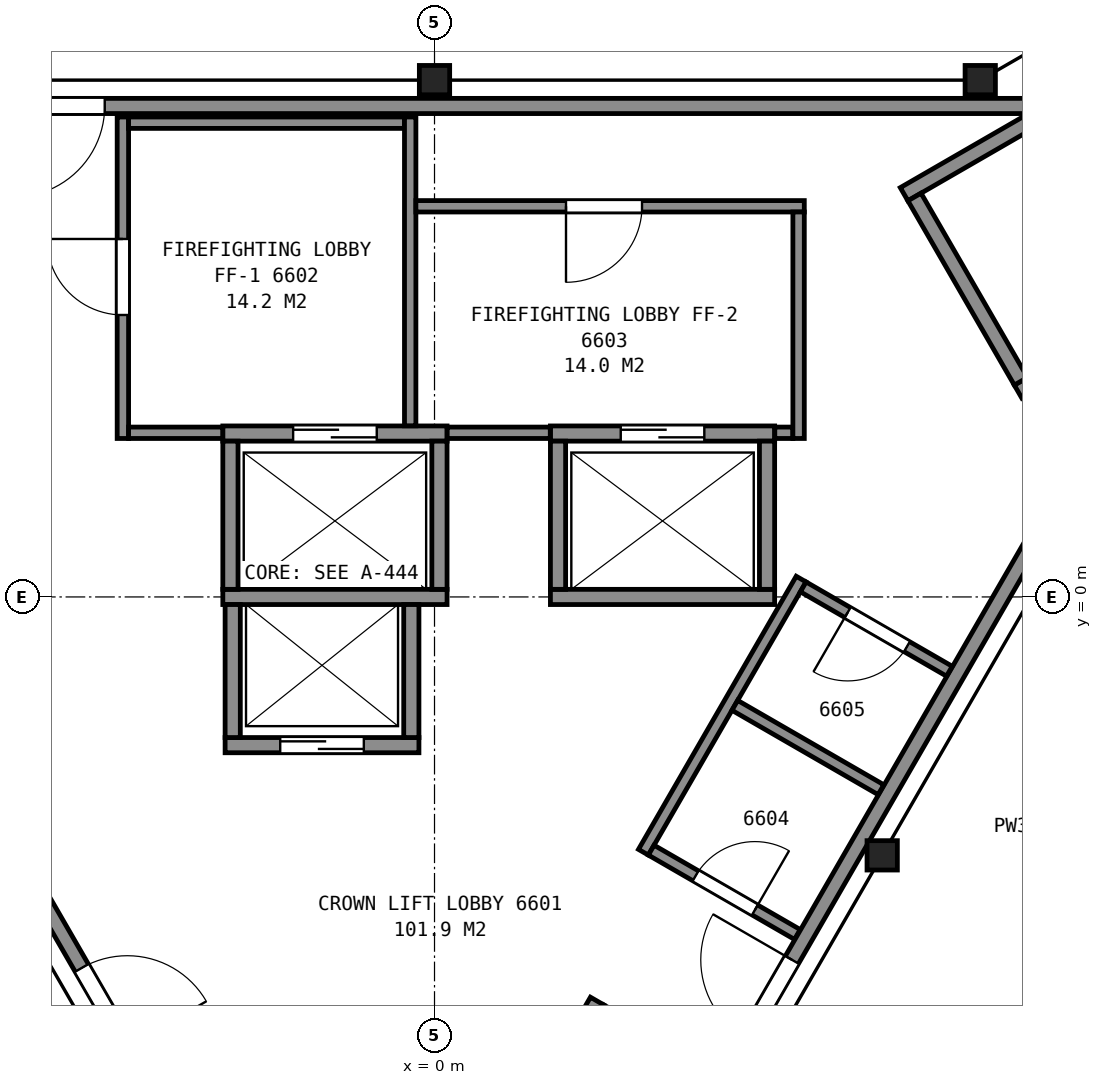
"""IFC4 building model, lengths in metres.
Left out: names, types, materials, properties, quantities, classifications, styles, units other than length and angle.
Written with IfcOpenShell. Run it as: python <this file> out.ifc"""

import sys

from ifc_helpers import new_model, si_unit, direction, frame, frame_2d, origin, origin_2d, place, context, subcontext, project, spatial, rectangle, i_section, extrude, element, fill, save


model = new_model("IFC4")
c1 = context("Model", 3, precision=1e-05, world=origin(), true_north=direction((0.0, 1.0)))
c2 = subcontext(c1, "Body", "Model", "MODEL_VIEW")
j1 = project(units=[si_unit("LENGTHUNIT", "METRE"), si_unit("PLANEANGLEUNIT", "RADIAN")], contexts=[c1])
p1 = place(None, origin())
s1 = spatial("IfcSite", under=j1, at=p1, CompositionType="ELEMENT")
p2 = place(p1, origin())
s2 = spatial("IfcBuilding", under=s1, at=p2, CompositionType="ELEMENT")
p3 = place(p2, frame((0.0, 0.0, 264.0)))
s3 = spatial("IfcBuildingStorey", under=s2, at=p3, CompositionType="ELEMENT", Elevation=264.0)
p4 = place(p3, frame((7.18, 6.8, 0.065), z_axis=(0.0, 0.0, 1.0), x_axis=(1.0, 0.0, 0.0)))
e1 = element("IfcColumn", 1, at=p4, inside=s3, PredefinedType="COLUMN", context=c2, shape_type="SweptSolid", body=[
    extrude(i_section(OverallWidth=0.399, OverallDepth=0.386, WebThickness=0.021, FlangeThickness=0.033, FilletRadius=0.015, at=origin_2d()), origin(), (0.0, 0.0, 1.0), 3.635),
])
p5 = place(p3, frame((0.0, 6.8, 0.03), z_axis=(0.0, 0.0, 1.0), x_axis=(1.0, 0.0, 0.0)))
e2 = element("IfcColumn", 2, at=p5, inside=s3, PredefinedType="COLUMN", context=c2, shape_type="SweptSolid", body=[
    extrude(i_section(OverallWidth=0.399, OverallDepth=0.386, WebThickness=0.021, FlangeThickness=0.033, FilletRadius=0.015, at=origin_2d()), origin(), (0.0, 0.0, 1.0), 3.67),
])
p6 = place(p3, frame((5.89, -3.4, 0.04), z_axis=(0.0, 0.0, 1.0), x_axis=(1.0, 0.0, 0.0)))
e3 = element("IfcColumn", 3, at=p6, inside=s3, PredefinedType="COLUMN", context=c2, shape_type="SweptSolid", body=[
    extrude(i_section(OverallWidth=0.399, OverallDepth=0.386, WebThickness=0.021, FlangeThickness=0.033, FilletRadius=0.015, at=origin_2d()), origin(), (0.0, 0.0, 1.0), 3.66),
])
for number, where, z_axis, x_axis in (
    (4, (6.178, 5.299, 0.0), (0.0, 0.0, 1.0), (0.866, 0.5, 0.0)),
    (5, (7.678, 2.701, 0.0), (0.0, 0.0, 1.0), (0.866, 0.5, 0.0)),
):
    element("IfcWall", number, at=place(p3, frame(where, z_axis=z_axis, x_axis=x_axis)), inside=s3, PredefinedType="PARTITIONING", context=c2, shape_type="SweptSolid", body=[
        extrude(rectangle(XDim=7.2, YDim=0.2, at=frame_2d((3.6, 0.0))), origin(), (0.0, 0.0, 1.0), 3.45),
    ])
p7 = place(p3, frame((7.715, 2.838, 0.0), z_axis=(0.0, 0.0, 1.0), x_axis=(-0.500049511043, 0.865996816683, 0.0)))
e6 = element("IfcWall", 6, at=p7, inside=s3, PredefinedType="PARTITIONING", context=c2, shape_type="SweptSolid", body=[
    extrude(rectangle(XDim=2.8, YDim=0.2, at=frame_2d((1.4, 0.0))), origin(), (0.0, 0.0, 1.0), 3.45),
])
p8 = place(p3, frame((-2.755, -1.95, 0.0), z_axis=(0.0, 0.0, 1.0), x_axis=(1.0, 0.0, 0.0)))
e7 = element("IfcWall", 7, at=p8, inside=s3, PredefinedType="PARTITIONING", context=c2, shape_type="SweptSolid", body=[
    extrude(rectangle(XDim=2.55, YDim=0.2, at=frame_2d((1.275, 0.0))), origin(), (0.0, 0.0, 1.0), 3.7),
])
p9 = place(p8, frame((0.725, 0.0, 0.0)))
e8 = element("IfcOpeningElement", 8, at=p9, cuts=e7, PredefinedType="OPENING", context=c2, shape_type="SweptSolid", body=[
    extrude(rectangle(XDim=1.1, YDim=2.1, at=frame_2d((0.55, 1.05))), frame((0.0, 0.11, 0.0), z_axis=(0.0, -1.0, 0.0), x_axis=(1.0, 0.0, 0.0)), (0.0, 0.0, 1.0), 0.22),
])
p10 = place(p3, frame((-2.785, 0.0, 0.0), z_axis=(0.0, 0.0, 1.0), x_axis=(1.0, 0.0, 0.0)))
e9 = element("IfcWall", 9, at=p10, inside=s3, PredefinedType="PARTITIONING", context=c2, shape_type="SweptSolid", body=[
    extrude(rectangle(XDim=2.95, YDim=0.2, at=frame_2d((1.475, 0.0))), origin(), (0.0, 0.0, 1.0), 3.7),
])
p11 = place(p3, frame((1.525, 0.0, 0.0), z_axis=(0.0, 0.0, 1.0), x_axis=(1.0, 0.0, 0.0)))
e10 = element("IfcWall", 10, at=p11, inside=s3, PredefinedType="PARTITIONING", context=c2, shape_type="SweptSolid", body=[
    extrude(rectangle(XDim=2.95, YDim=0.2, at=frame_2d((1.475, 0.0))), origin(), (0.0, 0.0, 1.0), 3.7),
])
p12 = place(p3, frame((-2.785, 2.15, 0.0), z_axis=(0.0, 0.0, 1.0), x_axis=(1.0, 0.0, 0.0)))
e11 = element("IfcWall", 11, at=p12, inside=s3, PredefinedType="PARTITIONING", context=c2, shape_type="SweptSolid", body=[
    extrude(rectangle(XDim=2.95, YDim=0.2, at=frame_2d((1.475, 0.0))), origin(), (0.0, 0.0, 1.0), 3.7),
])
p13 = place(p12, frame((0.925, 0.0, 0.0)))
e12 = element("IfcOpeningElement", 12, at=p13, cuts=e11, PredefinedType="OPENING", context=c2, shape_type="SweptSolid", body=[
    extrude(rectangle(XDim=1.1, YDim=2.1, at=frame_2d((0.55, 1.05))), frame((0.0, 0.11, 0.0), z_axis=(0.0, -1.0, 0.0), x_axis=(1.0, 0.0, 0.0)), (0.0, 0.0, 1.0), 0.22),
])
p14 = place(p3, frame((1.525, 2.15, 0.0), z_axis=(0.0, 0.0, 1.0), x_axis=(1.0, 0.0, 0.0)))
e13 = element("IfcWall", 13, at=p14, inside=s3, PredefinedType="PARTITIONING", context=c2, shape_type="SweptSolid", body=[
    extrude(rectangle(XDim=2.95, YDim=0.2, at=frame_2d((1.475, 0.0))), origin(), (0.0, 0.0, 1.0), 3.7),
])
p15 = place(p14, frame((0.925, 0.0, 0.0)))
e14 = element("IfcOpeningElement", 14, at=p15, cuts=e13, PredefinedType="OPENING", context=c2, shape_type="SweptSolid", body=[
    extrude(rectangle(XDim=1.1, YDim=2.1, at=frame_2d((0.55, 1.05))), frame((0.0, 0.11, 0.0), z_axis=(0.0, -1.0, 0.0), x_axis=(1.0, 0.0, 0.0)), (0.0, 0.0, 1.0), 0.22),
])
p16 = place(p3, frame((0.863, -7.525, 0.0), z_axis=(0.0, 0.0, 1.0), x_axis=(0.499990435942, 0.866030925526, 0.0)))
e15 = element("IfcWall", 15, at=p16, inside=s3, PredefinedType="PARTITIONING", context=c2, shape_type="SweptSolid", body=[
    extrude(rectangle(XDim=2.55, YDim=0.2, at=frame_2d((1.275, 0.0))), origin(), (0.0, 0.0, 1.0), 3.7),
])
p17 = place(p16, frame((0.725, 0.0, 0.0)))
e16 = element("IfcOpeningElement", 16, at=p17, cuts=e15, PredefinedType="OPENING", context=c2, shape_type="SweptSolid", body=[
    extrude(rectangle(XDim=1.1, YDim=2.1, at=frame_2d((0.55, 1.05))), frame((0.0, 0.11, 0.0), z_axis=(0.0, -1.0, 0.0), x_axis=(1.0, 0.0, 0.0)), (0.0, 0.0, 1.0), 0.22),
])
for number, where, z_axis, x_axis in (
    (17, (4.375, 0.1, 0.0), (0.0, 0.0, 1.0), (0.0, 1.0, 0.0)),
    (18, (1.625, 0.1, 0.0), (0.0, 0.0, 1.0), (0.0, 1.0, 0.0)),
    (19, (0.065, 0.1, 0.0), (0.0, 0.0, 1.0), (0.0, 1.0, 0.0)),
):
    element("IfcWall", number, at=place(p3, frame(where, z_axis=z_axis, x_axis=x_axis)), inside=s3, PredefinedType="PARTITIONING", context=c2, shape_type="SweptSolid", body=[
        extrude(rectangle(XDim=1.95, YDim=0.2, at=frame_2d((0.975, 0.0))), origin(), (0.0, 0.0, 1.0), 3.7),
    ])
for number, where, z_axis, x_axis in (
    (20, (-0.305, -1.85, 0.0), (0.0, 0.0, 1.0), (0.0, 1.0, 0.0)),
    (21, (-2.655, -1.85, 0.0), (0.0, 0.0, 1.0), (0.0, 1.0, 0.0)),
):
    element("IfcWall", number, at=place(p3, frame(where, z_axis=z_axis, x_axis=x_axis)), inside=s3, PredefinedType="PARTITIONING", context=c2, shape_type="SweptSolid", body=[
        extrude(rectangle(XDim=1.75, YDim=0.2, at=frame_2d((0.875, 0.0))), origin(), (0.0, 0.0, 1.0), 3.7),
    ])
p18 = place(p3, frame((-2.685, 0.1, 0.0), z_axis=(0.0, 0.0, 1.0), x_axis=(0.0, 1.0, 0.0)))
e22 = element("IfcWall", 22, at=p18, inside=s3, PredefinedType="PARTITIONING", context=c2, shape_type="SweptSolid", body=[
    extrude(rectangle(XDim=1.95, YDim=0.2, at=frame_2d((0.975, 0.0))), origin(), (0.0, 0.0, 1.0), 3.7),
])
p19 = place(p3, frame((3.69, -6.328, 0.0), z_axis=(0.0, 0.0, 1.0), x_axis=(-0.866036909293, 0.499980071345, 0.0)))
e23 = element("IfcWall", 23, at=p19, inside=s3, PredefinedType="PARTITIONING", context=c2, shape_type="SweptSolid", body=[
    extrude(rectangle(XDim=1.75, YDim=0.2, at=frame_2d((0.875, 0.0))), origin(), (0.0, 0.0, 1.0), 3.7),
])
p20 = place(p3, frame((7.829, 6.46, 0.0), z_axis=(0.0, 0.0, 1.0), x_axis=(-1.0, 0.0, 0.0)))
e24 = element("IfcWall", 24, at=p20, inside=s3, PredefinedType="PARTITIONING", context=c2, shape_type="SweptSolid", body=[
    extrude(rectangle(XDim=15.658, YDim=0.2, at=frame_2d((7.829, 0.0))), origin(), (0.0, 0.0, 1.0), 3.45),
])
p21 = place(p20, frame((12.168, 0.0, 0.0)))
e25 = element("IfcOpeningElement", 25, at=p21, cuts=e24, PredefinedType="OPENING", context=c2, shape_type="SweptSolid", body=[
    extrude(rectangle(XDim=1.2, YDim=2.1, at=frame_2d((0.6, 1.05))), frame((0.0, 0.11, 0.0), z_axis=(0.0, -1.0, 0.0), x_axis=(1.0, 0.0, 0.0)), (0.0, 0.0, 1.0), 0.22),
])
p22 = place(p3, frame((-7.141, -0.551, 0.0), z_axis=(0.0, 0.0, 1.0), x_axis=(0.500001302854, -0.86602465158, 0.0)))
e26 = element("IfcWall", 26, at=p22, inside=s3, PredefinedType="PARTITIONING", context=c2, shape_type="SweptSolid", body=[
    extrude(rectangle(XDim=6.846, YDim=0.2, at=frame_2d((3.423, 0.0))), origin(), (0.0, 0.0, 1.0), 3.45),
])
p23 = place(p22, frame((5.0, 0.0, 0.0)))
e27 = element("IfcOpeningElement", 27, at=p23, cuts=e26, PredefinedType="OPENING", context=c2, shape_type="SweptSolid", body=[
    extrude(rectangle(XDim=1.2, YDim=2.1, at=frame_2d((0.6, 1.05))), frame((0.0, 0.11, 0.0), z_axis=(0.0, -1.0, 0.0), x_axis=(1.0, 0.0, 0.0)), (0.0, 0.0, 1.0), 0.22),
])
p24 = place(p3, frame((-4.1, 2.085, 0.0), z_axis=(0.0, 0.0, 1.0), x_axis=(0.0, 1.0, 0.0)))
e28 = element("IfcWall", 28, at=p24, inside=s3, PredefinedType="PARTITIONING", context=c2, shape_type="SweptSolid", body=[
    extrude(rectangle(XDim=4.23, YDim=0.15, at=frame_2d((2.115, 0.0))), origin(), (0.0, 0.0, 1.0), 3.45),
])
p25 = place(p24, frame((1.625, 0.0, 0.0)))
e29 = element("IfcOpeningElement", 29, at=p25, cuts=e28, PredefinedType="OPENING", context=c2, shape_type="SweptSolid", body=[
    extrude(rectangle(XDim=1.0, YDim=2.1, at=frame_2d((0.5, 1.05))), frame((0.0, 0.085, 0.0), z_axis=(0.0, -1.0, 0.0), x_axis=(1.0, 0.0, 0.0)), (0.0, 0.0, 1.0), 0.17),
])
p26 = place(p3, frame((-4.025, 2.16, 0.0), z_axis=(0.0, 0.0, 1.0), x_axis=(1.0, 0.0, 0.0)))
e30 = element("IfcWall", 30, at=p26, inside=s3, PredefinedType="PARTITIONING", context=c2, shape_type="SweptSolid", body=[
    extrude(rectangle(XDim=1.238, YDim=0.15, at=frame_2d((0.619, 0.0))), origin(), (0.0, 0.0, 1.0), 3.45),
])
p27 = place(p3, frame((-4.025, 6.24, 0.0), z_axis=(0.0, 0.0, 1.0), x_axis=(1.0, 0.0, 0.0)))
e31 = element("IfcWall", 31, at=p27, inside=s3, PredefinedType="PARTITIONING", context=c2, shape_type="SweptSolid", body=[
    extrude(rectangle(XDim=3.63, YDim=0.15, at=frame_2d((1.815, 0.0))), origin(), (0.0, 0.0, 1.0), 3.45),
])
p28 = place(p3, frame((-0.32, 2.252, 0.0), z_axis=(0.0, 0.0, 1.0), x_axis=(0.0, 1.0, 0.0)))
e32 = element("IfcWall", 32, at=p28, inside=s3, PredefinedType="PARTITIONING", context=c2, shape_type="SweptSolid", body=[
    extrude(rectangle(XDim=4.063, YDim=0.15, at=frame_2d((2.031, 0.0))), origin(), (0.0, 0.0, 1.0), 3.45),
])
p29 = place(p3, frame((-0.245, 5.14, 0.0), z_axis=(0.0, 0.0, 1.0), x_axis=(1.0, 0.0, 0.0)))
e33 = element("IfcWall", 33, at=p29, inside=s3, PredefinedType="PARTITIONING", context=c2, shape_type="SweptSolid", body=[
    extrude(rectangle(XDim=5.11, YDim=0.15, at=frame_2d((2.555, 0.0))), origin(), (0.0, 0.0, 1.0), 3.45),
])
p30 = place(p29, frame((1.975, 0.0, 0.0)))
e34 = element("IfcOpeningElement", 34, at=p30, cuts=e33, PredefinedType="OPENING", context=c2, shape_type="SweptSolid", body=[
    extrude(rectangle(XDim=1.0, YDim=2.1, at=frame_2d((0.5, 1.05))), frame((0.0, 0.085, 0.0), z_axis=(0.0, -1.0, 0.0), x_axis=(1.0, 0.0, 0.0)), (0.0, 0.0, 1.0), 0.17),
])
p31 = place(p3, frame((0.167, 2.16, 0.0), z_axis=(0.0, 0.0, 1.0), x_axis=(1.0, 0.0, 0.0)))
e35 = element("IfcWall", 35, at=p31, inside=s3, PredefinedType="PARTITIONING", context=c2, shape_type="SweptSolid", body=[
    extrude(rectangle(XDim=1.356, YDim=0.15, at=frame_2d((0.678, 0.0))), origin(), (0.0, 0.0, 1.0), 3.45),
])
p32 = place(p3, frame((2.749, -3.359, 0.0), z_axis=(0.0, 0.0, 1.0), x_axis=(0.500017827812, 0.866015110648, 0.0)))
e36 = element("IfcWall", 36, at=p32, inside=s3, PredefinedType="PARTITIONING", context=c2, shape_type="SweptSolid", body=[
    extrude(rectangle(XDim=4.15, YDim=0.15, at=frame_2d((2.075, 0.0))), origin(), (0.0, 0.0, 1.0), 3.45),
])
p33 = place(p3, frame((2.851, -3.332, 0.0), z_axis=(0.0, 0.0, 1.0), x_axis=(0.866110524189, -0.499852538144, 0.0)))
e37 = element("IfcWall", 37, at=p33, inside=s3, PredefinedType="PARTITIONING", context=c2, shape_type="SweptSolid", body=[
    extrude(rectangle(XDim=2.22, YDim=0.15, at=frame_2d((1.11, 0.0))), origin(), (0.0, 0.0, 1.0), 3.45),
])
p34 = place(p33, frame((0.675, 0.0, 0.0)))
e38 = element("IfcOpeningElement", 38, at=p34, cuts=e37, PredefinedType="OPENING", context=c2, shape_type="SweptSolid", body=[
    extrude(rectangle(XDim=0.9, YDim=2.1, at=frame_2d((0.45, 1.05))), frame((0.0, 0.085, 0.0), z_axis=(0.0, -1.0, 0.0), x_axis=(1.0, 0.0, 0.0)), (0.0, 0.0, 1.0), 0.17),
])
p35 = place(p3, frame((3.828, -6.29, 0.0), z_axis=(0.0, 0.0, 1.0), x_axis=(0.499979739078, 0.866037101117, 0.0)))
e39 = element("IfcWall", 39, at=p35, inside=s3, PredefinedType="PARTITIONING", context=c2, shape_type="SweptSolid", body=[
    extrude(rectangle(XDim=11.363, YDim=0.2, at=frame_2d((5.681, 0.0))), origin(), (0.0, 0.0, 1.0), 3.45),
])
p36 = place(p35, frame((0.55, 0.0, 0.0)))
e40 = element("IfcOpeningElement", 40, at=p36, cuts=e39, PredefinedType="OPENING", context=c2, shape_type="SweptSolid", body=[
    extrude(rectangle(XDim=1.2, YDim=2.1, at=frame_2d((0.6, 1.05))), frame((0.0, 0.11, 0.0), z_axis=(0.0, -1.0, 0.0), x_axis=(1.0, 0.0, 0.0)), (0.0, 0.0, 1.0), 0.22),
])
p37 = place(p3, frame((3.951, -1.427, 0.0), z_axis=(0.0, 0.0, 1.0), x_axis=(0.866062920605, -0.499935013329, 0.0)))
e41 = element("IfcWall", 41, at=p37, inside=s3, PredefinedType="PARTITIONING", context=c2, shape_type="SweptSolid", body=[
    extrude(rectangle(XDim=2.22, YDim=0.15, at=frame_2d((1.11, 0.0))), origin(), (0.0, 0.0, 1.0), 3.45),
])
p38 = place(p3, frame((4.477, 2.16, 0.0), z_axis=(0.0, 0.0, 1.0), x_axis=(1.0, 0.0, 0.0)))
e42 = element("IfcWall", 42, at=p38, inside=s3, PredefinedType="PARTITIONING", context=c2, shape_type="SweptSolid", body=[
    extrude(rectangle(XDim=0.238, YDim=0.15, at=frame_2d((0.119, 0.0))), origin(), (0.0, 0.0, 1.0), 3.45),
])
p39 = place(p3, frame((6.774, -0.978, 0.0), z_axis=(0.0, 0.0, 1.0), x_axis=(-0.866062920605, 0.499935013329, 0.0)))
e43 = element("IfcWall", 43, at=p39, inside=s3, PredefinedType="PARTITIONING", context=c2, shape_type="SweptSolid", body=[
    extrude(rectangle(XDim=2.22, YDim=0.15, at=frame_2d((1.11, 0.0))), origin(), (0.0, 0.0, 1.0), 3.45),
])
p40 = place(p39, frame((0.646, 0.0, 0.0)))
e44 = element("IfcOpeningElement", 44, at=p40, cuts=e43, PredefinedType="OPENING", context=c2, shape_type="SweptSolid", body=[
    extrude(rectangle(XDim=0.9, YDim=2.1, at=frame_2d((0.45, 1.05))), frame((0.0, 0.085, 0.0), z_axis=(0.0, -1.0, 0.0), x_axis=(1.0, 0.0, 0.0)), (0.0, 0.0, 1.0), 0.17),
])
p41 = place(p3, frame((4.79, 2.085, 0.0), z_axis=(0.0, 0.0, 1.0), x_axis=(0.0, 1.0, 0.0)))
e45 = element("IfcWall", 45, at=p41, inside=s3, PredefinedType="PARTITIONING", context=c2, shape_type="SweptSolid", body=[
    extrude(rectangle(XDim=2.98, YDim=0.15, at=frame_2d((1.49, 0.0))), origin(), (0.0, 0.0, 1.0), 3.45),
])
p42 = place(p9, origin())
e46 = element("IfcDoor", 46, at=p42, inside=s3, OperationType="SLIDING_TO_RIGHT", PredefinedType="DOOR", context=c2, shape_type="SweptSolid", body=[
    extrude(rectangle(XDim=1.1, YDim=2.1, at=frame_2d((0.55, 1.05))), frame((0.0, 0.025, 0.0), z_axis=(0.0, -1.0, 0.0), x_axis=(1.0, 0.0, 0.0)), (0.0, 0.0, 1.0), 0.05),
])
fill(e8, e46)
p43 = place(p13, origin())
e47 = element("IfcDoor", 47, at=p43, inside=s3, OperationType="SLIDING_TO_LEFT", PredefinedType="DOOR", context=c2, shape_type="SweptSolid", body=[
    extrude(rectangle(XDim=1.1, YDim=2.1, at=frame_2d((0.55, 1.05))), frame((0.0, 0.025, 0.0), z_axis=(0.0, -1.0, 0.0), x_axis=(1.0, 0.0, 0.0)), (0.0, 0.0, 1.0), 0.05),
])
fill(e12, e47)
p44 = place(p15, origin())
e48 = element("IfcDoor", 48, at=p44, inside=s3, OperationType="SLIDING_TO_RIGHT", PredefinedType="DOOR", context=c2, shape_type="SweptSolid", body=[
    extrude(rectangle(XDim=1.1, YDim=2.1, at=frame_2d((0.55, 1.05))), frame((0.0, 0.025, 0.0), z_axis=(0.0, -1.0, 0.0), x_axis=(1.0, 0.0, 0.0)), (0.0, 0.0, 1.0), 0.05),
])
fill(e14, e48)
p45 = place(p21, origin())
e49 = element("IfcDoor", 49, at=p45, inside=s3, OperationType="SINGLE_SWING_RIGHT", PredefinedType="DOOR", context=c2, shape_type="SweptSolid", body=[
    extrude(rectangle(XDim=1.2, YDim=2.1, at=frame_2d((0.6, 1.05))), frame((0.0, 0.025, 0.0), z_axis=(0.0, -1.0, 0.0), x_axis=(1.0, 0.0, 0.0)), (0.0, 0.0, 1.0), 0.05),
])
fill(e25, e49)
p46 = place(p23, origin())
e50 = element("IfcDoor", 50, at=p46, inside=s3, OperationType="SINGLE_SWING_RIGHT", PredefinedType="DOOR", context=c2, shape_type="SweptSolid", body=[
    extrude(rectangle(XDim=1.2, YDim=2.1, at=frame_2d((0.6, 1.05))), frame((0.0, 0.025, 0.0), z_axis=(0.0, -1.0, 0.0), x_axis=(1.0, 0.0, 0.0)), (0.0, 0.0, 1.0), 0.05),
])
fill(e27, e50)
p47 = place(p25, origin())
e51 = element("IfcDoor", 51, at=p47, inside=s3, OperationType="SINGLE_SWING_RIGHT", PredefinedType="DOOR", context=c2, shape_type="SweptSolid", body=[
    extrude(rectangle(XDim=1.0, YDim=2.1, at=frame_2d((0.5, 1.05))), frame((0.0, 0.025, 0.0), z_axis=(0.0, -1.0, 0.0), x_axis=(1.0, 0.0, 0.0)), (0.0, 0.0, 1.0), 0.05),
])
fill(e29, e51)
p48 = place(p30, origin())
e52 = element("IfcDoor", 52, at=p48, inside=s3, OperationType="SINGLE_SWING_LEFT", PredefinedType="DOOR", context=c2, shape_type="SweptSolid", body=[
    extrude(rectangle(XDim=1.0, YDim=2.1, at=frame_2d((0.5, 1.05))), frame((0.0, 0.025, 0.0), z_axis=(0.0, -1.0, 0.0), x_axis=(1.0, 0.0, 0.0)), (0.0, 0.0, 1.0), 0.05),
])
fill(e34, e52)
p49 = place(p34, origin())
e53 = element("IfcDoor", 53, at=p49, inside=s3, OperationType="SINGLE_SWING_RIGHT", PredefinedType="DOOR", context=c2, shape_type="SweptSolid", body=[
    extrude(rectangle(XDim=0.9, YDim=2.1, at=frame_2d((0.45, 1.05))), frame((0.0, 0.025, 0.0), z_axis=(0.0, -1.0, 0.0), x_axis=(1.0, 0.0, 0.0)), (0.0, 0.0, 1.0), 0.05),
])
fill(e38, e53)
p50 = place(p36, origin())
e54 = element("IfcDoor", 54, at=p50, inside=s3, OperationType="SINGLE_SWING_RIGHT", PredefinedType="DOOR", context=c2, shape_type="SweptSolid", body=[
    extrude(rectangle(XDim=1.2, YDim=2.1, at=frame_2d((0.6, 1.05))), frame((0.0, 0.025, 0.0), z_axis=(0.0, -1.0, 0.0), x_axis=(1.0, 0.0, 0.0)), (0.0, 0.0, 1.0), 0.05),
])
fill(e40, e54)
p51 = place(p40, origin())
e55 = element("IfcDoor", 55, at=p51, inside=s3, OperationType="SINGLE_SWING_RIGHT", PredefinedType="DOOR", context=c2, shape_type="SweptSolid", body=[
    extrude(rectangle(XDim=0.9, YDim=2.1, at=frame_2d((0.45, 1.05))), frame((0.0, 0.025, 0.0), z_axis=(0.0, -1.0, 0.0), x_axis=(1.0, 0.0, 0.0)), (0.0, 0.0, 1.0), 0.05),
])
fill(e44, e55)
save(model, sys.argv[1])
